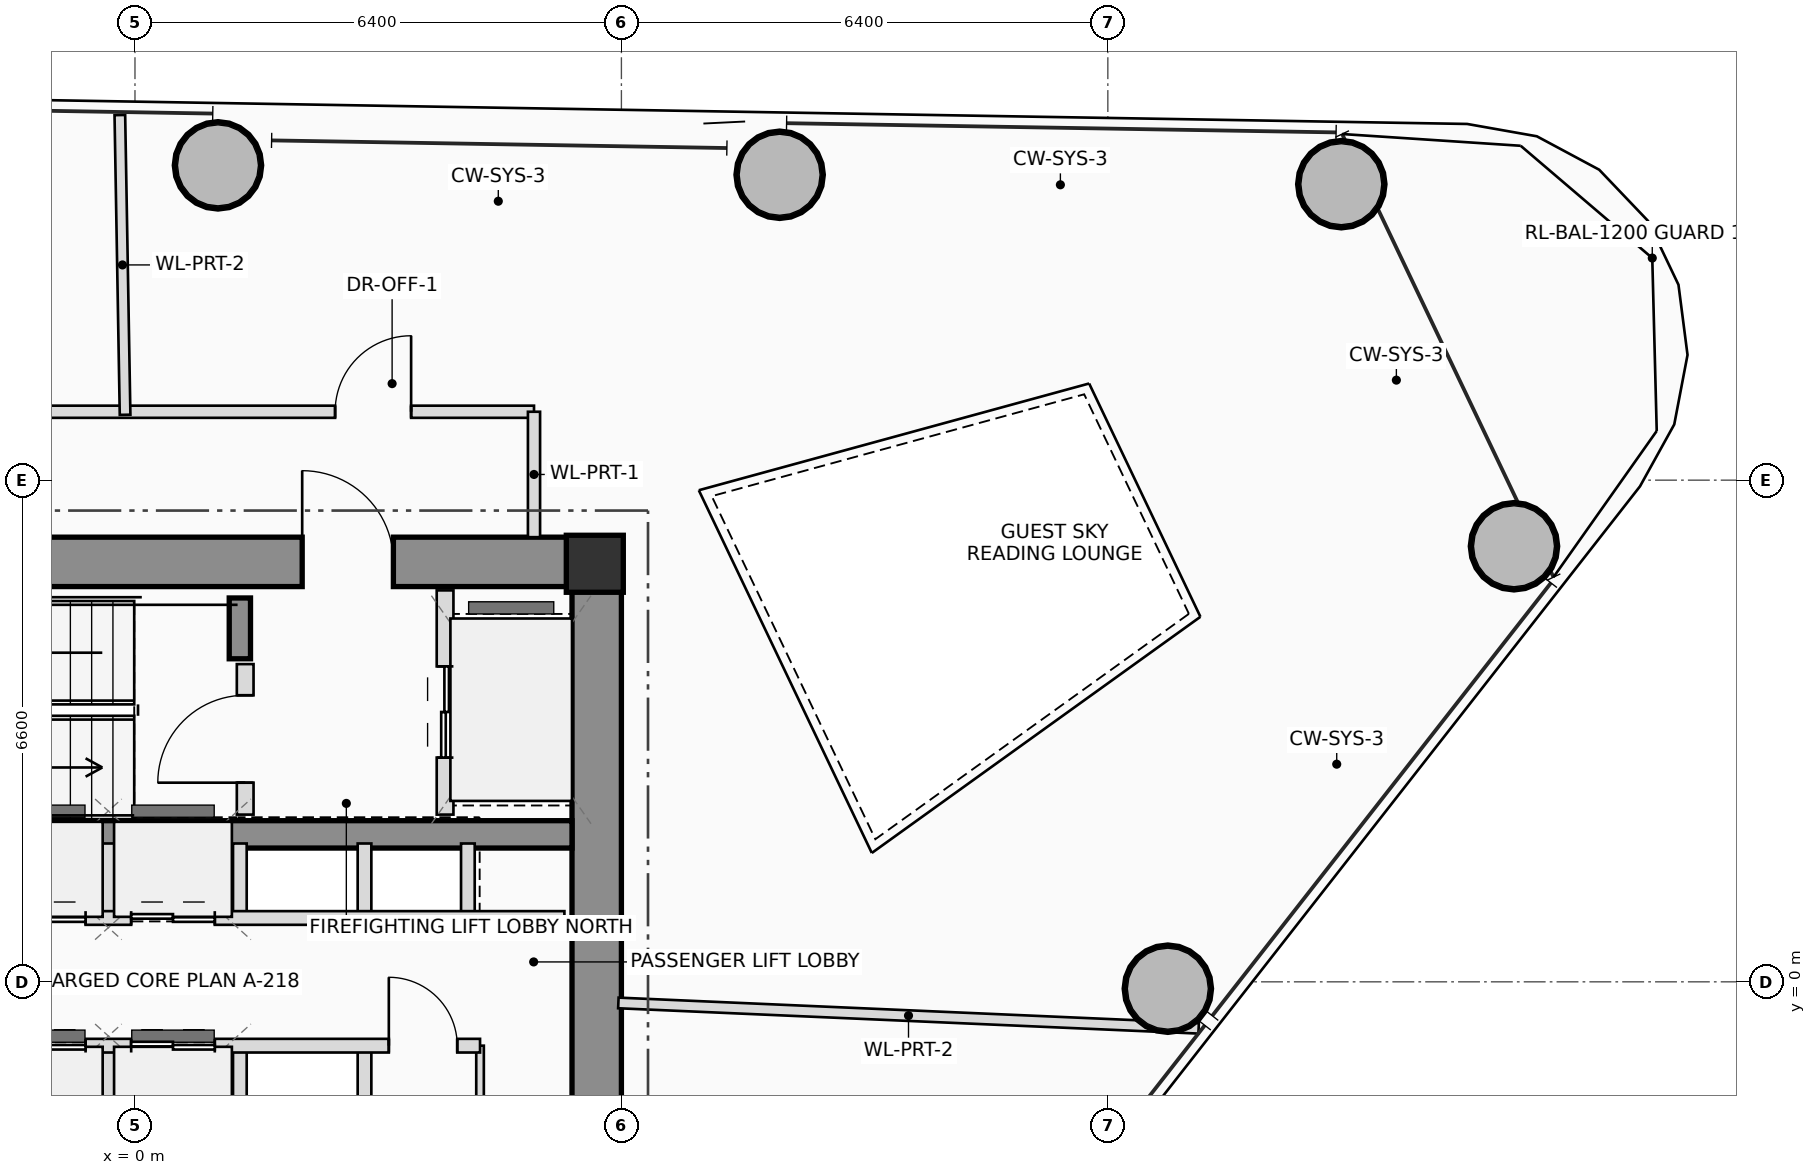
"""IFC4 building model, lengths in metres.
Left out: names, types, materials, properties, quantities, classifications, styles, units other than length and angle.
Written with IfcOpenShell. Run it as: python <this file> out.ifc"""

import sys

from ifc_helpers import new_model, si_unit, direction, frame, frame_2d, origin, origin_2d, place, context, subcontext, project, spatial, rectangle, hollow_circle, extrude, source, transform, mapped, element, fill, save


model = new_model("IFC4")
c1 = context("Model", 3, precision=1e-05, world=origin(), true_north=direction((0.0, 1.0)))
c2 = subcontext(c1, "Body", "Model", "MODEL_VIEW")
j1 = project(units=[si_unit("LENGTHUNIT", "METRE"), si_unit("PLANEANGLEUNIT", "RADIAN")], contexts=[c1])
p1 = place(None, origin())
s1 = spatial("IfcSite", under=j1, at=p1, CompositionType="ELEMENT")
p2 = place(p1, origin())
s2 = spatial("IfcBuilding", under=s1, at=p2, CompositionType="ELEMENT")
p3 = place(p2, frame((0.0, 0.0, 194.9)))
s3 = spatial("IfcBuildingStorey", under=s2, at=p3, CompositionType="ELEMENT", Elevation=194.9)
m1 = source(origin(), c2, "Body", "SweptSolid", [
    extrude(rectangle(XDim=0.75, YDim=0.75, at=origin_2d()), origin(), (0.0, 0.0, 1.0), 3.45),
])
p4 = place(p3, frame((6.05, 5.5, 0.0), z_axis=(0.0, 0.0, 1.0), x_axis=(1.0, 0.0, 0.0)))
e1 = element("IfcColumn", 1, at=p4, inside=s3, PredefinedType="COLUMN", context=c2, shape_type="MappedRepresentation", body=[
    mapped(m1, transform((0.0, 0.0, 0.0), scale=1.0)),
])
p5 = place(p3, frame((-6.4, 5.525, 0.0), z_axis=(0.0, 0.0, 1.0), x_axis=(1.0, 0.0, 0.0)))
e2 = element("IfcWall", 2, at=p5, inside=s3, PredefinedType="SHEAR", context=c2, shape_type="SweptSolid", body=[
    extrude(rectangle(XDim=12.8, YDim=0.65, at=frame_2d((6.4, 0.0))), origin(), (0.0, 0.0, 1.0), 3.45),
])
p6 = place(p5, frame((8.6, 0.0, 0.0)))
e3 = element("IfcOpeningElement", 3, at=p6, cuts=e2, PredefinedType="OPENING", context=c2, shape_type="SweptSolid", body=[
    extrude(rectangle(XDim=1.2, YDim=2.2, at=frame_2d((0.6, 1.1))), frame((0.0, 0.335, 0.0), z_axis=(0.0, -1.0, 0.0), x_axis=(1.0, 0.0, 0.0)), (0.0, 0.0, 1.0), 0.67),
])
p7 = place(p3, frame((6.075, -5.2, 0.0), z_axis=(0.0, 0.0, 1.0), x_axis=(0.0, 1.0, 0.0)))
e4 = element("IfcWall", 4, at=p7, inside=s3, PredefinedType="SHEAR", context=c2, shape_type="SweptSolid", body=[
    extrude(rectangle(XDim=10.4, YDim=0.65, at=frame_2d((5.2, 0.0))), origin(), (0.0, 0.0, 1.0), 3.45),
])
p8 = place(p3, frame((-5.75, 1.94, 0.0), z_axis=(0.0, 0.0, 1.0), x_axis=(1.0, 0.0, 0.0)))
e5 = element("IfcWall", 5, at=p8, inside=s3, PredefinedType="SHEAR", context=c2, shape_type="SweptSolid", body=[
    extrude(rectangle(XDim=11.5, YDim=0.36, at=frame_2d((5.75, 0.0))), origin(), (0.0, 0.0, 1.0), 3.45),
])
p9 = place(p3, frame((1.38, 4.25, 0.0), z_axis=(0.0, 0.0, 1.0), x_axis=(0.0, 1.0, 0.0)))
e6 = element("IfcWall", 6, at=p9, inside=s3, PredefinedType="SHEAR", context=c2, shape_type="SweptSolid", body=[
    extrude(rectangle(XDim=0.8, YDim=0.28, at=frame_2d((0.4, 0.0))), origin(), (0.0, 0.0, 1.0), 3.45),
])
m2 = source(origin(), c2, "Body", "SweptSolid", [
    extrude(hollow_circle(Radius=0.575, WallThickness=0.042, at=origin_2d()), origin(), (0.0, 0.0, 1.0), 3.45),
])
for number, where, z_axis, x_axis in (
    (7, (13.59, -0.09, 0.0), (0.0, 0.0, 1.0), (1.0, 0.0, 0.0)),
    (8, (18.144, 5.731, 0.0), (0.0, 0.0, 1.0), (1.0, 0.0, 0.0)),
    (9, (15.872, 10.494, 0.0), (0.0, 0.0, 1.0), (1.0, 0.0, 0.0)),
    (10, (8.482, 10.618, 0.0), (0.0, 0.0, 1.0), (1.0, 0.0, 0.0)),
    (11, (1.092, 10.742, 0.0), (0.0, 0.0, 1.0), (1.0, 0.0, 0.0)),
):
    element("IfcColumn", number, at=place(p3, frame(where, z_axis=z_axis, x_axis=x_axis)), inside=s3, PredefinedType="COLUMN", context=c2, shape_type="MappedRepresentation", body=[
        mapped(m2, transform((0.0, 0.0, 0.0), scale=1.0)),
    ])
p10 = place(p3, frame((1.45, 2.2, 0.0), z_axis=(0.0, 0.0, 1.0), x_axis=(0.0, 1.0, 0.0)))
e12 = element("IfcWall", 12, at=p10, inside=s3, PredefinedType="PLUMBINGWALL", context=c2, shape_type="SweptSolid", body=[
    extrude(rectangle(XDim=1.98, YDim=0.22, at=frame_2d((0.99, 0.0))), origin(), (0.0, 0.0, 1.0), 3.25),
])
p11 = place(p10, frame((0.42, 0.0, 0.0)))
e13 = element("IfcOpeningElement", 13, at=p11, cuts=e12, PredefinedType="OPENING", context=c2, shape_type="SweptSolid", body=[
    extrude(rectangle(XDim=1.15, YDim=2.15, at=frame_2d((0.575, 1.075))), frame((0.0, 0.12, 0.0), z_axis=(0.0, -1.0, 0.0), x_axis=(1.0, 0.0, 0.0)), (0.0, 0.0, 1.0), 0.24),
])
p12 = place(p3, frame((4.08, 2.2, 0.0), z_axis=(0.0, 0.0, 1.0), x_axis=(0.0, 1.0, 0.0)))
e14 = element("IfcWall", 14, at=p12, inside=s3, PredefinedType="PLUMBINGWALL", context=c2, shape_type="SweptSolid", body=[
    extrude(rectangle(XDim=2.95, YDim=0.22, at=frame_2d((1.475, 0.0))), origin(), (0.0, 0.0, 1.0), 3.25),
])
p13 = place(p12, frame((0.75, 0.0, 0.0)))
e15 = element("IfcOpeningElement", 15, at=p13, cuts=e14, PredefinedType="OPENING", context=c2, shape_type="SweptSolid", body=[
    extrude(rectangle(XDim=1.2, YDim=2.25, at=frame_2d((0.6, 1.125))), frame((0.0, 0.12, 0.0), z_axis=(0.0, -1.0, 0.0), x_axis=(1.0, 0.0, 0.0)), (0.0, 0.0, 1.0), 0.24),
])
for number, where, z_axis, x_axis in (
    (16, (-0.35, 0.84, 0.0), (0.0, 0.0, 1.0), (0.0, 1.0, 0.0)),
    (17, (-0.35, -1.82, 0.0), (0.0, 0.0, 1.0), (0.0, 1.0, 0.0)),
    (18, (1.38, 0.84, 0.0), (0.0, 0.0, 1.0), (0.0, 1.0, 0.0)),
    (19, (1.38, -1.82, 0.0), (0.0, 0.0, 1.0), (0.0, 1.0, 0.0)),
    (20, (3.02, 0.84, 0.0), (0.0, 0.0, 1.0), (0.0, 1.0, 0.0)),
    (21, (4.38, 0.84, 0.0), (0.0, 0.0, 1.0), (0.0, 1.0, 0.0)),
    (22, (3.02, -1.82, 0.0), (0.0, 0.0, 1.0), (0.0, 1.0, 0.0)),
):
    element("IfcWall", number, at=place(p3, frame(where, z_axis=z_axis, x_axis=x_axis)), inside=s3, PredefinedType="PLUMBINGWALL", context=c2, shape_type="SweptSolid", body=[
        extrude(rectangle(XDim=0.98, YDim=0.18, at=frame_2d((0.49, 0.0))), origin(), (0.0, 0.0, 1.0), 3.25),
    ])
p14 = place(p3, frame((4.54, -1.82, 0.0), z_axis=(0.0, 0.0, 1.0), x_axis=(0.0, 1.0, 0.0)))
e23 = element("IfcWall", 23, at=p14, inside=s3, PredefinedType="PARTITIONING", context=c2, shape_type="SweptSolid", body=[
    extrude(rectangle(XDim=0.98, YDim=0.1, at=frame_2d((0.49, 0.0))), origin(), (0.0, 0.0, 1.0), 3.25),
])
p15 = place(p3, frame((-5.68, 0.84, 0.0), z_axis=(0.0, 0.0, 1.0), x_axis=(1.0, 0.0, 0.0)))
e24 = element("IfcWall", 24, at=p15, inside=s3, PredefinedType="PLUMBINGWALL", context=c2, shape_type="SweptSolid", body=[
    extrude(rectangle(XDim=11.33, YDim=0.18, at=frame_2d((5.665, 0.0))), origin(), (0.0, 0.0, 1.0), 3.25),
])
p16 = place(p15, frame((1.38, 0.0, 0.0)))
e25 = element("IfcOpeningElement", 25, at=p16, cuts=e24, PredefinedType="OPENING", context=c2, shape_type="SweptSolid", body=[
    extrude(rectangle(XDim=0.9, YDim=2.05, at=frame_2d((0.45, 1.025))), frame((0.0, 0.1, 0.0), z_axis=(0.0, -1.0, 0.0), x_axis=(1.0, 0.0, 0.0)), (0.0, 0.0, 1.0), 0.2),
])
p17 = place(p15, frame((3.93, 0.0, 0.0)))
e26 = element("IfcOpeningElement", 26, at=p17, cuts=e24, PredefinedType="OPENING", context=c2, shape_type="SweptSolid", body=[
    extrude(rectangle(XDim=1.1, YDim=2.2, at=frame_2d((0.55, 1.1))), frame((0.0, 0.1, 0.0), z_axis=(0.0, -1.0, 0.0), x_axis=(1.0, 0.0, 0.0)), (0.0, 0.0, 1.0), 0.2),
])
p18 = place(p15, frame((5.63, 0.0, 0.0)))
e27 = element("IfcOpeningElement", 27, at=p18, cuts=e24, PredefinedType="OPENING", context=c2, shape_type="SweptSolid", body=[
    extrude(rectangle(XDim=1.1, YDim=2.2, at=frame_2d((0.55, 1.1))), frame((0.0, 0.1, 0.0), z_axis=(0.0, -1.0, 0.0), x_axis=(1.0, 0.0, 0.0)), (0.0, 0.0, 1.0), 0.2),
])
p19 = place(p3, frame((-5.68, -0.84, 0.0), z_axis=(0.0, 0.0, 1.0), x_axis=(1.0, 0.0, 0.0)))
e28 = element("IfcWall", 28, at=p19, inside=s3, PredefinedType="PLUMBINGWALL", context=c2, shape_type="SweptSolid", body=[
    extrude(rectangle(XDim=10.22, YDim=0.18, at=frame_2d((5.11, 0.0))), origin(), (0.0, 0.0, 1.0), 3.25),
])
p20 = place(p19, frame((1.38, 0.0, 0.0)))
e29 = element("IfcOpeningElement", 29, at=p20, cuts=e28, PredefinedType="OPENING", context=c2, shape_type="SweptSolid", body=[
    extrude(rectangle(XDim=0.9, YDim=2.05, at=frame_2d((0.45, 1.025))), frame((0.0, 0.1, 0.0), z_axis=(0.0, -1.0, 0.0), x_axis=(1.0, 0.0, 0.0)), (0.0, 0.0, 1.0), 0.2),
])
p21 = place(p19, frame((3.93, 0.0, 0.0)))
e30 = element("IfcOpeningElement", 30, at=p21, cuts=e28, PredefinedType="OPENING", context=c2, shape_type="SweptSolid", body=[
    extrude(rectangle(XDim=1.1, YDim=2.2, at=frame_2d((0.55, 1.1))), frame((0.0, 0.1, 0.0), z_axis=(0.0, -1.0, 0.0), x_axis=(1.0, 0.0, 0.0)), (0.0, 0.0, 1.0), 0.2),
])
p22 = place(p19, frame((5.63, 0.0, 0.0)))
e31 = element("IfcOpeningElement", 31, at=p22, cuts=e28, PredefinedType="OPENING", context=c2, shape_type="SweptSolid", body=[
    extrude(rectangle(XDim=1.1, YDim=2.2, at=frame_2d((0.55, 1.1))), frame((0.0, 0.1, 0.0), z_axis=(0.0, -1.0, 0.0), x_axis=(1.0, 0.0, 0.0)), (0.0, 0.0, 1.0), 0.2),
])
p23 = place(p19, frame((9.02, 0.0, 0.0)))
e32 = element("IfcOpeningElement", 32, at=p23, cuts=e28, PredefinedType="OPENING", context=c2, shape_type="SweptSolid", body=[
    extrude(rectangle(XDim=0.9, YDim=2.05, at=frame_2d((0.45, 1.025))), frame((0.0, 0.1, 0.0), z_axis=(0.0, -1.0, 0.0), x_axis=(1.0, 0.0, 0.0)), (0.0, 0.0, 1.0), 0.2),
])
p24 = place(p3, frame((-6.36, 7.5, 0.0), z_axis=(0.0, 0.0, 1.0), x_axis=(1.0, 0.0, 0.0)))
e33 = element("IfcWall", 33, at=p24, inside=s3, PredefinedType="PARTITIONING", context=c2, shape_type="SweptSolid", body=[
    extrude(rectangle(XDim=11.61, YDim=0.16, at=frame_2d((5.805, 0.0))), origin(), (0.0, 0.0, 1.0), 2.605),
])
p25 = place(p24, frame((3.948, 0.0, 0.0)))
e34 = element("IfcOpeningElement", 34, at=p25, cuts=e33, PredefinedType="OPENING", context=c2, shape_type="SweptSolid", body=[
    extrude(rectangle(XDim=1.0, YDim=2.25, at=frame_2d((0.5, 1.125))), frame((0.0, 0.09, 0.0), z_axis=(0.0, -1.0, 0.0), x_axis=(1.0, 0.0, 0.0)), (0.0, 0.0, 1.0), 0.18),
])
p26 = place(p24, frame((8.993, 0.0, 0.0)))
e35 = element("IfcOpeningElement", 35, at=p26, cuts=e33, PredefinedType="OPENING", context=c2, shape_type="SweptSolid", body=[
    extrude(rectangle(XDim=1.0, YDim=2.25, at=frame_2d((0.5, 1.125))), frame((0.0, 0.09, 0.0), z_axis=(0.0, -1.0, 0.0), x_axis=(1.0, 0.0, 0.0)), (0.0, 0.0, 1.0), 0.18),
])
p27 = place(p3, frame((5.25, 7.5, 0.0), z_axis=(0.0, 0.0, 1.0), x_axis=(0.0, -1.0, 0.0)))
e36 = element("IfcWall", 36, at=p27, inside=s3, PredefinedType="PARTITIONING", context=c2, shape_type="SweptSolid", body=[
    extrude(rectangle(XDim=1.65, YDim=0.16, at=frame_2d((0.825, 0.0))), origin(), (0.0, 0.0, 1.0), 2.605),
])
p28 = place(p3, frame((6.36, -0.278, 0.0), z_axis=(0.0, 0.0, 1.0), x_axis=(0.999047276506, -0.04364102778, 0.0)))
e37 = element("IfcWall", 37, at=p28, inside=s3, PredefinedType="PARTITIONING", context=c2, shape_type="SweptSolid", body=[
    extrude(rectangle(XDim=7.642, YDim=0.14, at=frame_2d((3.821, 0.0))), origin(), (0.0, 0.0, 1.0), 2.605),
])
p29 = place(p3, frame((-0.13, 7.46, 0.0), z_axis=(0.0, 0.0, 1.0), x_axis=(-0.017456477835, 0.999847624082, 0.0)))
e38 = element("IfcWall", 38, at=p29, inside=s3, PredefinedType="PARTITIONING", context=c2, shape_type="SweptSolid", body=[
    extrude(rectangle(XDim=3.944, YDim=0.14, at=frame_2d((1.972, 0.0))), origin(), (0.0, 0.0, 1.0), 2.765),
])
p30 = place(p6, origin())
e39 = element("IfcDoor", 39, at=p30, inside=s3, OperationType="SINGLE_SWING_LEFT", PredefinedType="DOOR", context=c2, shape_type="SweptSolid", body=[
    extrude(rectangle(XDim=1.2, YDim=2.2, at=frame_2d((0.6, 1.1))), frame((0.0, 0.025, 0.0), z_axis=(0.0, -1.0, 0.0), x_axis=(1.0, 0.0, 0.0)), (0.0, 0.0, 1.0), 0.05),
])
fill(e3, e39)
p31 = place(p11, origin())
e40 = element("IfcDoor", 40, at=p31, inside=s3, OperationType="SINGLE_SWING_LEFT", PredefinedType="DOOR", context=c2, shape_type="SweptSolid", body=[
    extrude(rectangle(XDim=1.15, YDim=2.15, at=frame_2d((0.575, 1.075))), frame((0.0, 0.025, 0.0), z_axis=(0.0, -1.0, 0.0), x_axis=(1.0, 0.0, 0.0)), (0.0, 0.0, 1.0), 0.05),
])
fill(e13, e40)
p32 = place(p13, origin())
e41 = element("IfcDoor", 41, at=p32, inside=s3, OperationType="DOUBLE_DOOR_SLIDING", PredefinedType="DOOR", context=c2, shape_type="SweptSolid", body=[
    extrude(rectangle(XDim=1.2, YDim=2.25, at=frame_2d((0.6, 1.125))), frame((0.0, 0.025, 0.0), z_axis=(0.0, -1.0, 0.0), x_axis=(1.0, 0.0, 0.0)), (0.0, 0.0, 1.0), 0.05),
])
fill(e15, e41)
p33 = place(p17, origin())
e42 = element("IfcDoor", 42, at=p33, inside=s3, OperationType="DOUBLE_DOOR_SLIDING", PredefinedType="DOOR", context=c2, shape_type="SweptSolid", body=[
    extrude(rectangle(XDim=1.1, YDim=2.2, at=frame_2d((0.55, 1.1))), frame((0.0, 0.025, 0.0), z_axis=(0.0, -1.0, 0.0), x_axis=(1.0, 0.0, 0.0)), (0.0, 0.0, 1.0), 0.05),
])
fill(e26, e42)
p34 = place(p18, origin())
e43 = element("IfcDoor", 43, at=p34, inside=s3, OperationType="DOUBLE_DOOR_SLIDING", PredefinedType="DOOR", context=c2, shape_type="SweptSolid", body=[
    extrude(rectangle(XDim=1.1, YDim=2.2, at=frame_2d((0.55, 1.1))), frame((0.0, 0.025, 0.0), z_axis=(0.0, -1.0, 0.0), x_axis=(1.0, 0.0, 0.0)), (0.0, 0.0, 1.0), 0.05),
])
fill(e27, e43)
p35 = place(p21, origin())
e44 = element("IfcDoor", 44, at=p35, inside=s3, OperationType="DOUBLE_DOOR_SLIDING", PredefinedType="DOOR", context=c2, shape_type="SweptSolid", body=[
    extrude(rectangle(XDim=1.1, YDim=2.2, at=frame_2d((0.55, 1.1))), frame((0.0, 0.025, 0.0), z_axis=(0.0, -1.0, 0.0), x_axis=(1.0, 0.0, 0.0)), (0.0, 0.0, 1.0), 0.05),
])
fill(e30, e44)
p36 = place(p22, origin())
e45 = element("IfcDoor", 45, at=p36, inside=s3, OperationType="DOUBLE_DOOR_SLIDING", PredefinedType="DOOR", context=c2, shape_type="SweptSolid", body=[
    extrude(rectangle(XDim=1.1, YDim=2.2, at=frame_2d((0.55, 1.1))), frame((0.0, 0.025, 0.0), z_axis=(0.0, -1.0, 0.0), x_axis=(1.0, 0.0, 0.0)), (0.0, 0.0, 1.0), 0.05),
])
fill(e31, e45)
p37 = place(p23, origin())
e46 = element("IfcDoor", 46, at=p37, inside=s3, OperationType="SINGLE_SWING_LEFT", PredefinedType="DOOR", context=c2, shape_type="SweptSolid", body=[
    extrude(rectangle(XDim=0.9, YDim=2.05, at=frame_2d((0.45, 1.025))), frame((0.0, 0.025, 0.0), z_axis=(0.0, -1.0, 0.0), x_axis=(1.0, 0.0, 0.0)), (0.0, 0.0, 1.0), 0.05),
])
fill(e32, e46)
p38 = place(p26, origin())
e47 = element("IfcDoor", 47, at=p38, inside=s3, OperationType="SINGLE_SWING_RIGHT", PredefinedType="DOOR", context=c2, shape_type="SweptSolid", body=[
    extrude(rectangle(XDim=1.0, YDim=2.25, at=frame_2d((0.5, 1.125))), frame((0.0, 0.025, 0.0), z_axis=(0.0, -1.0, 0.0), x_axis=(1.0, 0.0, 0.0)), (0.0, 0.0, 1.0), 0.05),
])
fill(e35, e47)
save(model, sys.argv[1])
